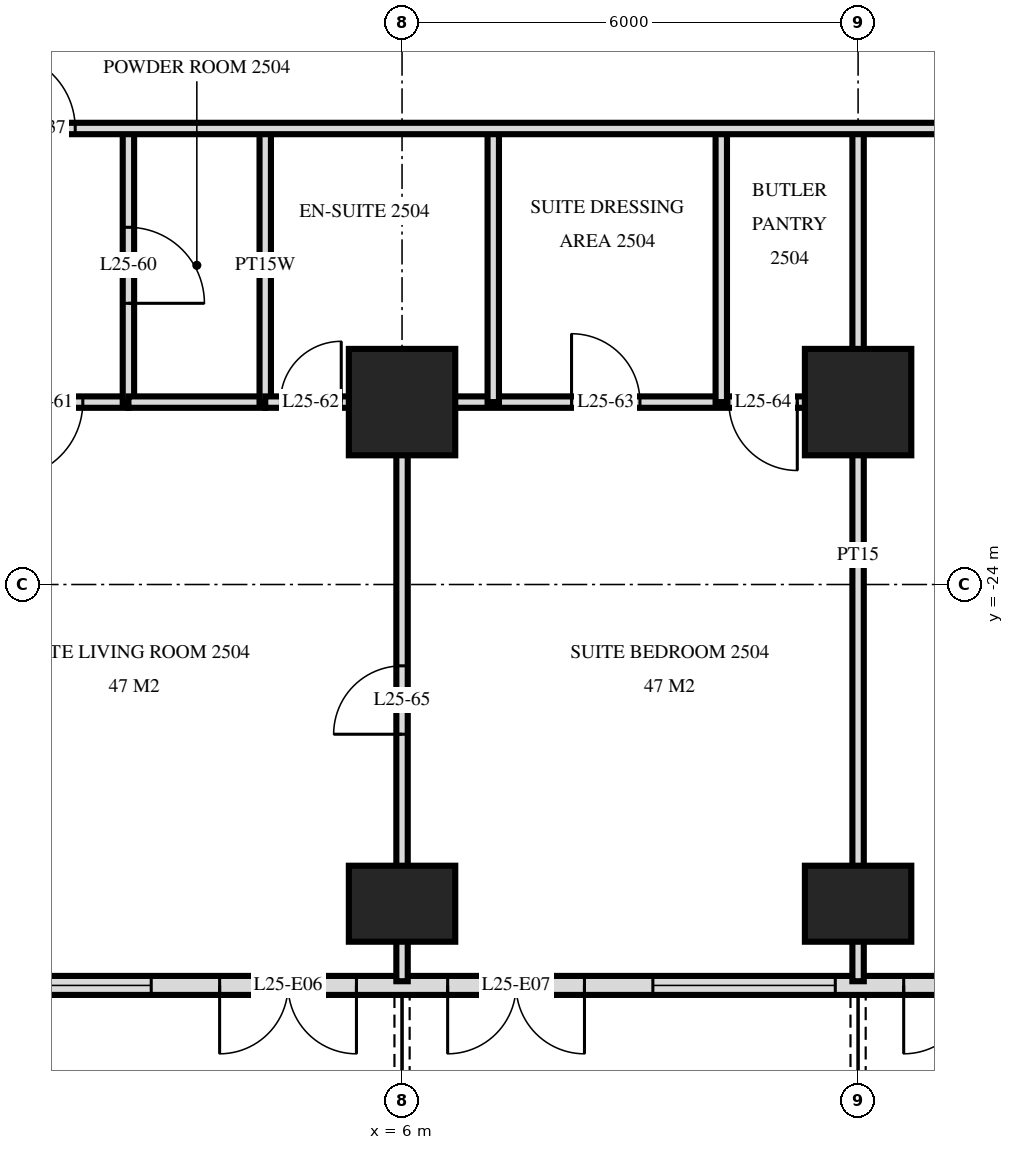
"""IFC4 building model, lengths in metres.
Left out: names, types, materials, properties, quantities, classifications, styles, units other than length and angle.
Written with IfcOpenShell. Run it as: python <this file> out.ifc"""

import sys

from ifc_helpers import new_model, si_unit, direction, frame, frame_2d, origin, origin_2d, place, context, subcontext, project, spatial, rectangle, extrude, element, fill, save


model = new_model("IFC4")
c1 = context("Model", 3, precision=1e-05, world=origin(), true_north=direction((0.0, 1.0)))
c2 = subcontext(c1, "Body", "Model", "MODEL_VIEW")
j1 = project(units=[si_unit("LENGTHUNIT", "METRE"), si_unit("PLANEANGLEUNIT", "RADIAN")], contexts=[c1])
p1 = place(None, origin())
s1 = spatial("IfcSite", under=j1, at=p1, CompositionType="ELEMENT")
p2 = place(p1, origin())
s2 = spatial("IfcBuilding", under=s1, at=p2, CompositionType="ELEMENT")
p3 = place(p2, frame((0.0, 0.0, 99.6)))
s3 = spatial("IfcBuildingStorey", under=s2, at=p3, CompositionType="ELEMENT", Elevation=99.6)
p4 = place(p3, frame((6.0, -28.2, 0.0), z_axis=(0.0, 0.0, 1.0), x_axis=(1.0, 0.0, 0.0)))
e1 = element("IfcColumn", 1, at=p4, inside=s3, PredefinedType="COLUMN", context=c2, shape_type="SweptSolid", body=[
    extrude(rectangle(XDim=1.4, YDim=1.0, at=origin_2d()), origin(), (0.0, 0.0, 1.0), 3.6),
])
p5 = place(p3, frame((6.0, -21.6, 0.0), z_axis=(0.0, 0.0, 1.0), x_axis=(1.0, 0.0, 0.0)))
e2 = element("IfcColumn", 2, at=p5, inside=s3, PredefinedType="COLUMN", context=c2, shape_type="SweptSolid", body=[
    extrude(rectangle(XDim=1.4, YDim=1.4, at=origin_2d()), origin(), (0.0, 0.0, 1.0), 3.6),
])
p6 = place(p3, frame((12.0, -28.2, 0.0), z_axis=(0.0, 0.0, 1.0), x_axis=(1.0, 0.0, 0.0)))
e3 = element("IfcColumn", 3, at=p6, inside=s3, PredefinedType="COLUMN", context=c2, shape_type="SweptSolid", body=[
    extrude(rectangle(XDim=1.4, YDim=1.0, at=origin_2d()), origin(), (0.0, 0.0, 1.0), 3.6),
])
p7 = place(p3, frame((12.0, -21.6, 0.0), z_axis=(0.0, 0.0, 1.0), x_axis=(1.0, 0.0, 0.0)))
e4 = element("IfcColumn", 4, at=p7, inside=s3, PredefinedType="COLUMN", context=c2, shape_type="SweptSolid", body=[
    extrude(rectangle(XDim=1.4, YDim=1.4, at=origin_2d()), origin(), (0.0, 0.0, 1.0), 3.6),
])
p8 = place(p3, frame((-28.775, -29.275, 0.0), z_axis=(0.0, 0.0, 1.0), x_axis=(1.0, 0.0, 0.0)))
e5 = element("IfcWall", 5, at=p8, inside=s3, PredefinedType="SOLIDWALL", context=c2, shape_type="SweptSolid", body=[
    extrude(rectangle(XDim=57.551, YDim=0.25, at=frame_2d((28.775, 0.0))), origin(), (0.0, 0.0, 1.0), 3.32),
])
p9 = place(p8, frame((0.575, 0.0, 0.0)))
e6 = element("IfcOpeningElement", 6, at=p9, cuts=e5, PredefinedType="OPENING", context=c2, shape_type="SweptSolid", body=[
    extrude(rectangle(XDim=1.8, YDim=2.4, at=frame_2d((0.9, 1.2))), frame((0.0, 0.135, 0.0), z_axis=(0.0, -1.0, 0.0), x_axis=(1.0, 0.0, 0.0)), (0.0, 0.0, 1.0), 0.27),
])
p10 = place(p8, frame((5.375, 0.0, 0.0)))
e7 = element("IfcOpeningElement", 7, at=p10, cuts=e5, PredefinedType="OPENING", context=c2, shape_type="SweptSolid", body=[
    extrude(rectangle(XDim=1.8, YDim=2.4, at=frame_2d((0.9, 1.2))), frame((0.0, 0.135, 0.0), z_axis=(0.0, -1.0, 0.0), x_axis=(1.0, 0.0, 0.0)), (0.0, 0.0, 1.0), 0.27),
])
p11 = place(p8, frame((8.075, 0.0, 0.3)))
e8 = element("IfcOpeningElement", 8, at=p11, cuts=e5, PredefinedType="OPENING", context=c2, shape_type="SweptSolid", body=[
    extrude(rectangle(XDim=2.4, YDim=2.1, at=frame_2d((1.2, 1.05))), frame((0.0, 0.135, 0.0), z_axis=(0.0, -1.0, 0.0), x_axis=(1.0, 0.0, 0.0)), (0.0, 0.0, 1.0), 0.27),
])
p12 = place(p8, frame((11.375, 0.0, 0.0)))
e9 = element("IfcOpeningElement", 9, at=p12, cuts=e5, PredefinedType="OPENING", context=c2, shape_type="SweptSolid", body=[
    extrude(rectangle(XDim=1.8, YDim=2.4, at=frame_2d((0.9, 1.2))), frame((0.0, 0.135, 0.0), z_axis=(0.0, -1.0, 0.0), x_axis=(1.0, 0.0, 0.0)), (0.0, 0.0, 1.0), 0.27),
])
p13 = place(p8, frame((14.075, 0.0, 0.3)))
e10 = element("IfcOpeningElement", 10, at=p13, cuts=e5, PredefinedType="OPENING", context=c2, shape_type="SweptSolid", body=[
    extrude(rectangle(XDim=2.4, YDim=2.1, at=frame_2d((1.2, 1.05))), frame((0.0, 0.135, 0.0), z_axis=(0.0, -1.0, 0.0), x_axis=(1.0, 0.0, 0.0)), (0.0, 0.0, 1.0), 0.27),
])
p14 = place(p8, frame((17.375, 0.0, 0.0)))
e11 = element("IfcOpeningElement", 11, at=p14, cuts=e5, PredefinedType="OPENING", context=c2, shape_type="SweptSolid", body=[
    extrude(rectangle(XDim=1.8, YDim=2.4, at=frame_2d((0.9, 1.2))), frame((0.0, 0.135, 0.0), z_axis=(0.0, -1.0, 0.0), x_axis=(1.0, 0.0, 0.0)), (0.0, 0.0, 1.0), 0.27),
])
p15 = place(p8, frame((20.075, 0.0, 0.3)))
e12 = element("IfcOpeningElement", 12, at=p15, cuts=e5, PredefinedType="OPENING", context=c2, shape_type="SweptSolid", body=[
    extrude(rectangle(XDim=2.4, YDim=2.1, at=frame_2d((1.2, 1.05))), frame((0.0, 0.135, 0.0), z_axis=(0.0, -1.0, 0.0), x_axis=(1.0, 0.0, 0.0)), (0.0, 0.0, 1.0), 0.27),
])
p16 = place(p8, frame((23.075, 0.0, 0.3)))
e13 = element("IfcOpeningElement", 13, at=p16, cuts=e5, PredefinedType="OPENING", context=c2, shape_type="SweptSolid", body=[
    extrude(rectangle(XDim=2.4, YDim=2.1, at=frame_2d((1.2, 1.05))), frame((0.0, 0.135, 0.0), z_axis=(0.0, -1.0, 0.0), x_axis=(1.0, 0.0, 0.0)), (0.0, 0.0, 1.0), 0.27),
])
p17 = place(p8, frame((26.375, 0.0, 0.0)))
e14 = element("IfcOpeningElement", 14, at=p17, cuts=e5, PredefinedType="OPENING", context=c2, shape_type="SweptSolid", body=[
    extrude(rectangle(XDim=1.8, YDim=2.4, at=frame_2d((0.9, 1.2))), frame((0.0, 0.135, 0.0), z_axis=(0.0, -1.0, 0.0), x_axis=(1.0, 0.0, 0.0)), (0.0, 0.0, 1.0), 0.27),
])
p18 = place(p8, frame((29.075, 0.0, 0.3)))
e15 = element("IfcOpeningElement", 15, at=p18, cuts=e5, PredefinedType="OPENING", context=c2, shape_type="SweptSolid", body=[
    extrude(rectangle(XDim=2.4, YDim=2.1, at=frame_2d((1.2, 1.05))), frame((0.0, 0.135, 0.0), z_axis=(0.0, -1.0, 0.0), x_axis=(1.0, 0.0, 0.0)), (0.0, 0.0, 1.0), 0.27),
])
p19 = place(p8, frame((32.375, 0.0, 0.0)))
e16 = element("IfcOpeningElement", 16, at=p19, cuts=e5, PredefinedType="OPENING", context=c2, shape_type="SweptSolid", body=[
    extrude(rectangle(XDim=1.8, YDim=2.4, at=frame_2d((0.9, 1.2))), frame((0.0, 0.135, 0.0), z_axis=(0.0, -1.0, 0.0), x_axis=(1.0, 0.0, 0.0)), (0.0, 0.0, 1.0), 0.27),
])
p20 = place(p8, frame((35.375, 0.0, 0.0)))
e17 = element("IfcOpeningElement", 17, at=p20, cuts=e5, PredefinedType="OPENING", context=c2, shape_type="SweptSolid", body=[
    extrude(rectangle(XDim=1.8, YDim=2.4, at=frame_2d((0.9, 1.2))), frame((0.0, 0.135, 0.0), z_axis=(0.0, -1.0, 0.0), x_axis=(1.0, 0.0, 0.0)), (0.0, 0.0, 1.0), 0.27),
])
p21 = place(p8, frame((38.075, 0.0, 0.3)))
e18 = element("IfcOpeningElement", 18, at=p21, cuts=e5, PredefinedType="OPENING", context=c2, shape_type="SweptSolid", body=[
    extrude(rectangle(XDim=2.4, YDim=2.1, at=frame_2d((1.2, 1.05))), frame((0.0, 0.135, 0.0), z_axis=(0.0, -1.0, 0.0), x_axis=(1.0, 0.0, 0.0)), (0.0, 0.0, 1.0), 0.27),
])
p22 = place(p8, frame((41.375, 0.0, 0.0)))
e19 = element("IfcOpeningElement", 19, at=p22, cuts=e5, PredefinedType="OPENING", context=c2, shape_type="SweptSolid", body=[
    extrude(rectangle(XDim=1.8, YDim=2.4, at=frame_2d((0.9, 1.2))), frame((0.0, 0.135, 0.0), z_axis=(0.0, -1.0, 0.0), x_axis=(1.0, 0.0, 0.0)), (0.0, 0.0, 1.0), 0.27),
])
p23 = place(p8, frame((44.075, 0.0, 0.3)))
e20 = element("IfcOpeningElement", 20, at=p23, cuts=e5, PredefinedType="OPENING", context=c2, shape_type="SweptSolid", body=[
    extrude(rectangle(XDim=2.4, YDim=2.1, at=frame_2d((1.2, 1.05))), frame((0.0, 0.135, 0.0), z_axis=(0.0, -1.0, 0.0), x_axis=(1.0, 0.0, 0.0)), (0.0, 0.0, 1.0), 0.27),
])
p24 = place(p8, frame((47.075, 0.0, 0.3)))
e21 = element("IfcOpeningElement", 21, at=p24, cuts=e5, PredefinedType="OPENING", context=c2, shape_type="SweptSolid", body=[
    extrude(rectangle(XDim=2.4, YDim=2.1, at=frame_2d((1.2, 1.05))), frame((0.0, 0.135, 0.0), z_axis=(0.0, -1.0, 0.0), x_axis=(1.0, 0.0, 0.0)), (0.0, 0.0, 1.0), 0.27),
])
p25 = place(p8, frame((50.375, 0.0, 0.0)))
e22 = element("IfcOpeningElement", 22, at=p25, cuts=e5, PredefinedType="OPENING", context=c2, shape_type="SweptSolid", body=[
    extrude(rectangle(XDim=1.8, YDim=2.4, at=frame_2d((0.9, 1.2))), frame((0.0, 0.135, 0.0), z_axis=(0.0, -1.0, 0.0), x_axis=(1.0, 0.0, 0.0)), (0.0, 0.0, 1.0), 0.27),
])
p26 = place(p8, frame((53.375, 0.0, 0.0)))
e23 = element("IfcOpeningElement", 23, at=p26, cuts=e5, PredefinedType="OPENING", context=c2, shape_type="SweptSolid", body=[
    extrude(rectangle(XDim=1.8, YDim=2.4, at=frame_2d((0.9, 1.2))), frame((0.0, 0.135, 0.0), z_axis=(0.0, -1.0, 0.0), x_axis=(1.0, 0.0, 0.0)), (0.0, 0.0, 1.0), 0.27),
])
p27 = place(p3, frame((12.0, -29.22, 0.0), z_axis=(0.0, 0.0, 1.0), x_axis=(0.0, 1.0, 0.0)))
e24 = element("IfcWall", 24, at=p27, inside=s3, PredefinedType="PARTITIONING", context=c2, shape_type="SweptSolid", body=[
    extrude(rectangle(XDim=11.22, YDim=0.15, at=frame_2d((5.61, 0.0))), origin(), (0.0, 0.0, 1.0), 3.32),
])
for number, where, z_axis, x_axis in (
    (25, (10.2, -21.6, 0.0), (0.0, 0.0, 1.0), (0.0, 1.0, 0.0)),
    (26, (7.2, -21.6, 0.0), (0.0, 0.0, 1.0), (0.0, 1.0, 0.0)),
):
    element("IfcWall", number, at=place(p3, frame(where, z_axis=z_axis, x_axis=x_axis)), inside=s3, PredefinedType="PARTITIONING", context=c2, shape_type="SweptSolid", body=[
        extrude(rectangle(XDim=3.6, YDim=0.15, at=frame_2d((1.8, 0.0))), origin(), (0.0, 0.0, 1.0), 3.32),
    ])
p28 = place(p3, frame((6.0, -29.22, 0.0), z_axis=(0.0, 0.0, 1.0), x_axis=(0.0, 1.0, 0.0)))
e27 = element("IfcWall", 27, at=p28, inside=s3, PredefinedType="PARTITIONING", context=c2, shape_type="SweptSolid", body=[
    extrude(rectangle(XDim=7.62, YDim=0.15, at=frame_2d((3.81, 0.0))), origin(), (0.0, 0.0, 1.0), 3.32),
])
p29 = place(p28, frame((3.25, 0.0, 0.0)))
e28 = element("IfcOpeningElement", 28, at=p29, cuts=e27, PredefinedType="OPENING", context=c2, shape_type="SweptSolid", body=[
    extrude(rectangle(XDim=0.9, YDim=2.1, at=frame_2d((0.45, 1.05))), frame((0.0, 0.085, 0.0), z_axis=(0.0, -1.0, 0.0), x_axis=(1.0, 0.0, 0.0)), (0.0, 0.0, 1.0), 0.17),
])
p30 = place(p3, frame((4.2, -21.6, 0.0), z_axis=(0.0, 0.0, 1.0), x_axis=(0.0, 1.0, 0.0)))
e29 = element("IfcWall", 29, at=p30, inside=s3, PredefinedType="PLUMBINGWALL", context=c2, shape_type="SweptSolid", body=[
    extrude(rectangle(XDim=3.6, YDim=0.15, at=frame_2d((1.8, 0.0))), origin(), (0.0, 0.0, 1.0), 3.32),
])
p31 = place(p3, frame((2.4, -21.6, 0.0), z_axis=(0.0, 0.0, 1.0), x_axis=(0.0, 1.0, 0.0)))
e30 = element("IfcWall", 30, at=p31, inside=s3, PredefinedType="PARTITIONING", context=c2, shape_type="SweptSolid", body=[
    extrude(rectangle(XDim=3.6, YDim=0.15, at=frame_2d((1.8, 0.0))), origin(), (0.0, 0.0, 1.0), 3.32),
])
p32 = place(p31, frame((1.3, 0.0, 0.0)))
e31 = element("IfcOpeningElement", 31, at=p32, cuts=e30, PredefinedType="OPENING", context=c2, shape_type="SweptSolid", body=[
    extrude(rectangle(XDim=1.0, YDim=2.1, at=frame_2d((0.5, 1.05))), frame((0.0, 0.085, 0.0), z_axis=(0.0, -1.0, 0.0), x_axis=(1.0, 0.0, 0.0)), (0.0, 0.0, 1.0), 0.17),
])
p33 = place(p3, frame((0.0, -21.6, 0.0), z_axis=(0.0, 0.0, 1.0), x_axis=(1.0, 0.0, 0.0)))
e32 = element("IfcWall", 32, at=p33, inside=s3, PredefinedType="PARTITIONING", context=c2, shape_type="SweptSolid", body=[
    extrude(rectangle(XDim=2.4, YDim=0.15, at=frame_2d((1.2, 0.0))), origin(), (0.0, 0.0, 1.0), 3.32),
])
p34 = place(p33, frame((0.8, 0.0, 0.0)))
e33 = element("IfcOpeningElement", 33, at=p34, cuts=e32, PredefinedType="OPENING", context=c2, shape_type="SweptSolid", body=[
    extrude(rectangle(XDim=1.0, YDim=2.1, at=frame_2d((0.5, 1.05))), frame((0.0, 0.085, 0.0), z_axis=(0.0, -1.0, 0.0), x_axis=(1.0, 0.0, 0.0)), (0.0, 0.0, 1.0), 0.17),
])
p35 = place(p3, frame((4.2, -21.6, 0.0), z_axis=(0.0, 0.0, 1.0), x_axis=(1.0, 0.0, 0.0)))
e34 = element("IfcWall", 34, at=p35, inside=s3, PredefinedType="PARTITIONING", context=c2, shape_type="SweptSolid", body=[
    extrude(rectangle(XDim=7.8, YDim=0.15, at=frame_2d((3.9, 0.0))), origin(), (0.0, 0.0, 1.0), 3.32),
])
p36 = place(p35, frame((0.2, 0.0, 0.0)))
e35 = element("IfcOpeningElement", 35, at=p36, cuts=e34, PredefinedType="OPENING", context=c2, shape_type="SweptSolid", body=[
    extrude(rectangle(XDim=0.8, YDim=2.1, at=frame_2d((0.4, 1.05))), frame((0.0, 0.085, 0.0), z_axis=(0.0, -1.0, 0.0), x_axis=(1.0, 0.0, 0.0)), (0.0, 0.0, 1.0), 0.17),
])
p37 = place(p35, frame((4.03, 0.0, 0.0)))
e36 = element("IfcOpeningElement", 36, at=p37, cuts=e34, PredefinedType="OPENING", context=c2, shape_type="SweptSolid", body=[
    extrude(rectangle(XDim=0.9, YDim=2.1, at=frame_2d((0.45, 1.05))), frame((0.0, 0.085, 0.0), z_axis=(0.0, -1.0, 0.0), x_axis=(1.0, 0.0, 0.0)), (0.0, 0.0, 1.0), 0.17),
])
p38 = place(p35, frame((6.1, 0.0, 0.0)))
e37 = element("IfcOpeningElement", 37, at=p38, cuts=e34, PredefinedType="OPENING", context=c2, shape_type="SweptSolid", body=[
    extrude(rectangle(XDim=0.9, YDim=2.1, at=frame_2d((0.45, 1.05))), frame((0.0, 0.085, 0.0), z_axis=(0.0, -1.0, 0.0), x_axis=(1.0, 0.0, 0.0)), (0.0, 0.0, 1.0), 0.17),
])
p39 = place(p3, frame((2.4, -21.6, 0.0), z_axis=(0.0, 0.0, 1.0), x_axis=(1.0, 0.0, 0.0)))
e38 = element("IfcWall", 38, at=p39, inside=s3, PredefinedType="PLUMBINGWALL", context=c2, shape_type="SweptSolid", body=[
    extrude(rectangle(XDim=1.8, YDim=0.15, at=frame_2d((0.9, 0.0))), origin(), (0.0, 0.0, 1.0), 3.32),
])
p40 = place(p3, frame((-33.12, -18.0, 0.0), z_axis=(0.0, 0.0, 1.0), x_axis=(1.0, 0.0, 0.0)))
e39 = element("IfcWall", 39, at=p40, inside=s3, PredefinedType="PARTITIONING", context=c2, shape_type="SweptSolid", body=[
    extrude(rectangle(XDim=66.24, YDim=0.15, at=frame_2d((33.12, 0.0))), origin(), (0.0, 0.0, 1.0), 3.32),
])
p41 = place(p40, frame((14.02, 0.0, 0.0)))
e40 = element("IfcOpeningElement", 40, at=p41, cuts=e39, PredefinedType="OPENING", context=c2, shape_type="SweptSolid", body=[
    extrude(rectangle(XDim=1.0, YDim=2.1, at=frame_2d((0.5, 1.05))), frame((0.0, 0.085, 0.0), z_axis=(0.0, -1.0, 0.0), x_axis=(1.0, 0.0, 0.0)), (0.0, 0.0, 1.0), 0.17),
])
p42 = place(p40, frame((18.82, 0.0, 0.0)))
e41 = element("IfcOpeningElement", 41, at=p42, cuts=e39, PredefinedType="OPENING", context=c2, shape_type="SweptSolid", body=[
    extrude(rectangle(XDim=1.0, YDim=2.1, at=frame_2d((0.5, 1.05))), frame((0.0, 0.085, 0.0), z_axis=(0.0, -1.0, 0.0), x_axis=(1.0, 0.0, 0.0)), (0.0, 0.0, 1.0), 0.17),
])
p43 = place(p40, frame((30.27, 0.0, 0.0)))
e42 = element("IfcOpeningElement", 42, at=p43, cuts=e39, PredefinedType="OPENING", context=c2, shape_type="SweptSolid", body=[
    extrude(rectangle(XDim=1.0, YDim=2.1, at=frame_2d((0.5, 1.05))), frame((0.0, 0.085, 0.0), z_axis=(0.0, -1.0, 0.0), x_axis=(1.0, 0.0, 0.0)), (0.0, 0.0, 1.0), 0.17),
])
p44 = place(p40, frame((33.82, 0.0, 0.0)))
e43 = element("IfcOpeningElement", 43, at=p44, cuts=e39, PredefinedType="OPENING", context=c2, shape_type="SweptSolid", body=[
    extrude(rectangle(XDim=1.0, YDim=2.1, at=frame_2d((0.5, 1.05))), frame((0.0, 0.085, 0.0), z_axis=(0.0, -1.0, 0.0), x_axis=(1.0, 0.0, 0.0)), (0.0, 0.0, 1.0), 0.17),
])
p45 = place(p40, frame((46.27, 0.0, 0.0)))
e44 = element("IfcOpeningElement", 44, at=p45, cuts=e39, PredefinedType="OPENING", context=c2, shape_type="SweptSolid", body=[
    extrude(rectangle(XDim=1.0, YDim=2.1, at=frame_2d((0.5, 1.05))), frame((0.0, 0.085, 0.0), z_axis=(0.0, -1.0, 0.0), x_axis=(1.0, 0.0, 0.0)), (0.0, 0.0, 1.0), 0.17),
])
p46 = place(p40, frame((6.07, 0.0, 0.0)))
e45 = element("IfcOpeningElement", 45, at=p46, cuts=e39, PredefinedType="OPENING", context=c2, shape_type="SweptSolid", body=[
    extrude(rectangle(XDim=1.0, YDim=2.1, at=frame_2d((0.5, 1.05))), frame((0.0, 0.085, 0.0), z_axis=(0.0, -1.0, 0.0), x_axis=(1.0, 0.0, 0.0)), (0.0, 0.0, 1.0), 0.17),
])
p47 = place(p40, frame((60.37, 0.0, 0.0)))
e46 = element("IfcOpeningElement", 46, at=p47, cuts=e39, PredefinedType="OPENING", context=c2, shape_type="SweptSolid", body=[
    extrude(rectangle(XDim=1.0, YDim=2.1, at=frame_2d((0.5, 1.05))), frame((0.0, 0.085, 0.0), z_axis=(0.0, -1.0, 0.0), x_axis=(1.0, 0.0, 0.0)), (0.0, 0.0, 1.0), 0.17),
])
p48 = place(p18, origin())
e47 = element("IfcWindow", 47, at=p48, inside=s3, PartitioningType="SINGLE_PANEL", PredefinedType="WINDOW", context=c2, shape_type="SweptSolid", body=[
    extrude(rectangle(XDim=2.4, YDim=2.1, at=frame_2d((1.2, 1.05))), frame((0.0, 0.03, 0.0), z_axis=(0.0, -1.0, 0.0), x_axis=(1.0, 0.0, 0.0)), (0.0, 0.0, 1.0), 0.06),
])
fill(e15, e47)
p49 = place(p19, frame((0.9, 0.0, 0.0), z_axis=(0.0, 0.0, 1.0), x_axis=(-1.0, 0.0, 0.0)))
e48 = element("IfcDoor", 48, at=p49, inside=s3, OperationType="DOUBLE_DOOR_SINGLE_SWING", PredefinedType="DOOR", context=c2, shape_type="SweptSolid", body=[
    extrude(rectangle(XDim=1.8, YDim=2.4, at=frame_2d((0.0, 1.2))), frame((0.0, -0.025, 0.0), z_axis=(0.0, 1.0, 0.0), x_axis=(-1.0, 0.0, 0.0)), (0.0, 0.0, 1.0), 0.05),
])
fill(e16, e48)
p50 = place(p20, frame((0.9, 0.0, 0.0), z_axis=(0.0, 0.0, 1.0), x_axis=(-1.0, 0.0, 0.0)))
e49 = element("IfcDoor", 49, at=p50, inside=s3, OperationType="DOUBLE_DOOR_SINGLE_SWING", PredefinedType="DOOR", context=c2, shape_type="SweptSolid", body=[
    extrude(rectangle(XDim=1.8, YDim=2.4, at=frame_2d((0.0, 1.2))), frame((0.0, -0.025, 0.0), z_axis=(0.0, 1.0, 0.0), x_axis=(-1.0, 0.0, 0.0)), (0.0, 0.0, 1.0), 0.05),
])
fill(e17, e49)
p51 = place(p21, origin())
e50 = element("IfcWindow", 50, at=p51, inside=s3, PartitioningType="SINGLE_PANEL", PredefinedType="WINDOW", context=c2, shape_type="SweptSolid", body=[
    extrude(rectangle(XDim=2.4, YDim=2.1, at=frame_2d((1.2, 1.05))), frame((0.0, 0.03, 0.0), z_axis=(0.0, -1.0, 0.0), x_axis=(1.0, 0.0, 0.0)), (0.0, 0.0, 1.0), 0.06),
])
fill(e18, e50)
p52 = place(p22, frame((0.9, 0.0, 0.0), z_axis=(0.0, 0.0, 1.0), x_axis=(-1.0, 0.0, 0.0)))
e51 = element("IfcDoor", 51, at=p52, inside=s3, OperationType="DOUBLE_DOOR_SINGLE_SWING", PredefinedType="DOOR", context=c2, shape_type="SweptSolid", body=[
    extrude(rectangle(XDim=1.8, YDim=2.4, at=frame_2d((0.0, 1.2))), frame((0.0, -0.025, 0.0), z_axis=(0.0, 1.0, 0.0), x_axis=(-1.0, 0.0, 0.0)), (0.0, 0.0, 1.0), 0.05),
])
fill(e19, e51)
p53 = place(p44, origin())
e52 = element("IfcDoor", 52, at=p53, inside=s3, OperationType="SINGLE_SWING_RIGHT", PredefinedType="DOOR", context=c2, shape_type="SweptSolid", body=[
    extrude(rectangle(XDim=1.0, YDim=2.1, at=frame_2d((0.5, 1.05))), frame((0.0, 0.025, 0.0), z_axis=(0.0, -1.0, 0.0), x_axis=(1.0, 0.0, 0.0)), (0.0, 0.0, 1.0), 0.05),
])
fill(e43, e52)
p54 = place(p32, frame((0.5, 0.0, 0.0), z_axis=(0.0, 0.0, 1.0), x_axis=(-1.0, 0.0, 0.0)))
e53 = element("IfcDoor", 53, at=p54, inside=s3, OperationType="SINGLE_SWING_LEFT", PredefinedType="DOOR", context=c2, shape_type="SweptSolid", body=[
    extrude(rectangle(XDim=1.0, YDim=2.1, at=frame_2d((0.0, 1.05))), frame((0.0, -0.025, 0.0), z_axis=(0.0, 1.0, 0.0), x_axis=(-1.0, 0.0, 0.0)), (0.0, 0.0, 1.0), 0.05),
])
fill(e31, e53)
p55 = place(p34, frame((0.5, 0.0, 0.0), z_axis=(0.0, 0.0, 1.0), x_axis=(-1.0, 0.0, 0.0)))
e54 = element("IfcDoor", 54, at=p55, inside=s3, OperationType="SINGLE_SWING_LEFT", PredefinedType="DOOR", context=c2, shape_type="SweptSolid", body=[
    extrude(rectangle(XDim=1.0, YDim=2.1, at=frame_2d((0.0, 1.05))), frame((0.0, -0.025, 0.0), z_axis=(0.0, 1.0, 0.0), x_axis=(-1.0, 0.0, 0.0)), (0.0, 0.0, 1.0), 0.05),
])
fill(e33, e54)
p56 = place(p36, origin())
e55 = element("IfcDoor", 55, at=p56, inside=s3, OperationType="SINGLE_SWING_LEFT", PredefinedType="DOOR", context=c2, shape_type="SweptSolid", body=[
    extrude(rectangle(XDim=0.8, YDim=2.1, at=frame_2d((0.4, 1.05))), frame((0.0, 0.025, 0.0), z_axis=(0.0, -1.0, 0.0), x_axis=(1.0, 0.0, 0.0)), (0.0, 0.0, 1.0), 0.05),
])
fill(e35, e55)
p57 = place(p37, origin())
e56 = element("IfcDoor", 56, at=p57, inside=s3, OperationType="SINGLE_SWING_RIGHT", PredefinedType="DOOR", context=c2, shape_type="SweptSolid", body=[
    extrude(rectangle(XDim=0.9, YDim=2.1, at=frame_2d((0.45, 1.05))), frame((0.0, 0.025, 0.0), z_axis=(0.0, -1.0, 0.0), x_axis=(1.0, 0.0, 0.0)), (0.0, 0.0, 1.0), 0.05),
])
fill(e36, e56)
p58 = place(p38, frame((0.45, 0.0, 0.0), z_axis=(0.0, 0.0, 1.0), x_axis=(-1.0, 0.0, 0.0)))
e57 = element("IfcDoor", 57, at=p58, inside=s3, OperationType="SINGLE_SWING_RIGHT", PredefinedType="DOOR", context=c2, shape_type="SweptSolid", body=[
    extrude(rectangle(XDim=0.9, YDim=2.1, at=frame_2d((0.0, 1.05))), frame((0.0, -0.025, 0.0), z_axis=(0.0, 1.0, 0.0), x_axis=(-1.0, 0.0, 0.0)), (0.0, 0.0, 1.0), 0.05),
])
fill(e37, e57)
p59 = place(p29, origin())
e58 = element("IfcDoor", 58, at=p59, inside=s3, OperationType="SINGLE_SWING_RIGHT", PredefinedType="DOOR", context=c2, shape_type="SweptSolid", body=[
    extrude(rectangle(XDim=0.9, YDim=2.1, at=frame_2d((0.45, 1.05))), frame((0.0, 0.025, 0.0), z_axis=(0.0, -1.0, 0.0), x_axis=(1.0, 0.0, 0.0)), (0.0, 0.0, 1.0), 0.05),
])
fill(e28, e58)
save(model, sys.argv[1])
